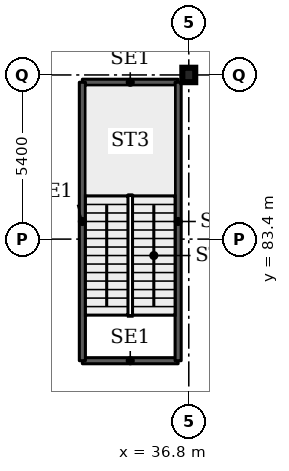
"""IFC4 building model, lengths in metres.
Left out: names, types, materials, properties, quantities, classifications, styles, units other than length and angle.
Written with IfcOpenShell. Run it as: python <this file> out.ifc"""

import sys

from ifc_helpers import new_model, si_unit, direction, frame, frame_2d, origin, origin_2d, place, context, subcontext, project, spatial, rectangle, i_section, extrude, element, save


model = new_model("IFC4")
c1 = context("Model", 3, precision=1e-05, world=origin(), true_north=direction((0.0, 1.0)))
c2 = subcontext(c1, "Body", "Model", "MODEL_VIEW")
j1 = project(units=[si_unit("LENGTHUNIT", "METRE"), si_unit("PLANEANGLEUNIT", "RADIAN")], contexts=[c1])
p1 = place(None, origin())
s1 = spatial("IfcSite", under=j1, at=p1, CompositionType="ELEMENT")
p2 = place(p1, origin())
s2 = spatial("IfcBuilding", under=s1, at=p2, CompositionType="ELEMENT")
p3 = place(p2, frame((0.0, 0.0, 7.5)))
s3 = spatial("IfcBuildingStorey", under=s2, at=p3, CompositionType="ELEMENT", Elevation=7.5)
p4 = place(p3, frame((36.8, 88.8, 0.0), z_axis=(0.0, 0.0, 1.0), x_axis=(1.0, 0.0, 0.0)))
e1 = element("IfcColumn", 1, at=p4, inside=s3, PredefinedType="COLUMN", context=c2, shape_type="SweptSolid", body=[
    extrude(i_section(OverallWidth=0.424, OverallDepth=0.474, WebThickness=0.048, FlangeThickness=0.077, FilletRadius=0.014, at=origin_2d()), origin(), (0.0, 0.0, 1.0), 5.0),
])
for number, where, z_axis, x_axis in (
    (2, (33.3, 79.4, 0.0), (0.0, 0.0, 1.0), (1.0, 0.0, 0.0)),
    (3, (33.3, 88.56, 0.0), (0.0, 0.0, 1.0), (1.0, 0.0, 0.0)),
):
    element("IfcWall", number, at=place(p3, frame(where, z_axis=z_axis, x_axis=x_axis)), inside=s3, PredefinedType="SHEAR", context=c2, shape_type="SweptSolid", body=[
        extrude(rectangle(XDim=3.15, YDim=0.2, at=frame_2d((1.575, 0.0))), origin(), (0.0, 0.0, 1.0), 5.0),
    ])
for number, where, z_axis, x_axis in (
    (4, (33.3, 79.4, 0.0), (0.0, 0.0, 1.0), (0.0, 1.0, 0.0)),
    (5, (36.45, 79.4, 0.0), (0.0, 0.0, 1.0), (0.0, 1.0, 0.0)),
):
    element("IfcWall", number, at=place(p3, frame(where, z_axis=z_axis, x_axis=x_axis)), inside=s3, PredefinedType="SHEAR", context=c2, shape_type="SweptSolid", body=[
        extrude(rectangle(XDim=9.16, YDim=0.2, at=frame_2d((4.58, 0.0))), origin(), (0.0, 0.0, 1.0), 5.0),
    ])
save(model, sys.argv[1])
